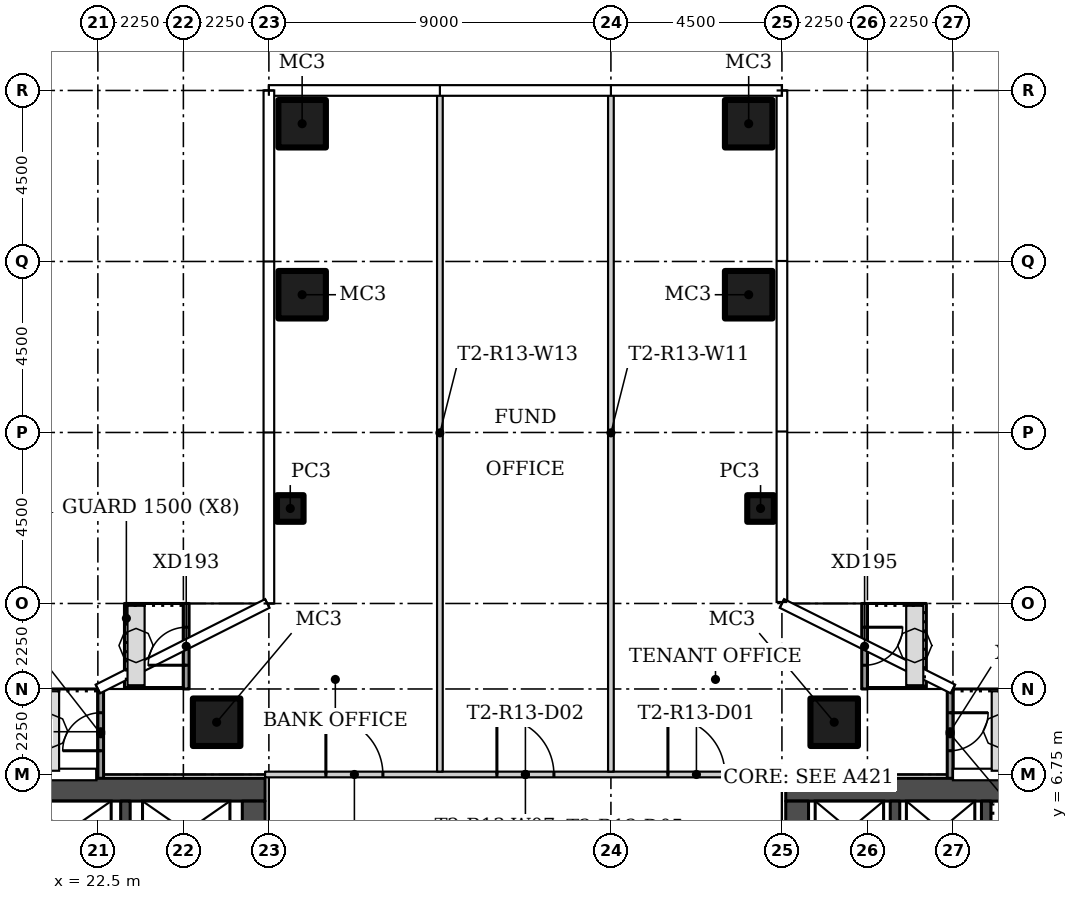
"""IFC4 building model, lengths in metres.
Left out: names, types, materials, properties, quantities, classifications, styles, units other than length and angle.
Written with IfcOpenShell. Run it as: python <this file> out.ifc"""

import sys

from ifc_helpers import new_model, si_unit, direction, frame, frame_2d, origin, origin_2d, place, context, subcontext, project, spatial, rectangle, hollow_rectangle, extrude, element, fill, save


model = new_model("IFC4")
c1 = context("Model", 3, precision=1e-05, world=origin(), true_north=direction((0.0, 1.0)))
c2 = subcontext(c1, "Body", "Model", "MODEL_VIEW")
j1 = project(units=[si_unit("LENGTHUNIT", "METRE"), si_unit("PLANEANGLEUNIT", "RADIAN")], contexts=[c1])
p1 = place(None, origin())
s1 = spatial("IfcSite", under=j1, at=p1, CompositionType="ELEMENT")
p2 = place(p1, origin())
s2 = spatial("IfcBuilding", under=s1, at=p2, CompositionType="ELEMENT")
p3 = place(p2, frame((0.0, 0.0, 124.8)))
s3 = spatial("IfcBuildingStorey", under=s2, at=p3, CompositionType="ELEMENT", Elevation=124.8)
for number, where in (
    (1, (25.625, 8.125, 0.0)),
    (2, (41.875, 8.125, 0.0)),
):
    element("IfcColumn", number, at=place(p3, frame(where)), inside=s3, PredefinedType="COLUMN", context=c2, shape_type="SweptSolid", body=[
        extrude(hollow_rectangle(XDim=1.25, YDim=1.25, WallThickness=0.05, at=origin_2d()), origin(), (0.0, 0.0, 1.0), 3.45),
    ])
p4 = place(p3, frame((39.938, 13.75, 0.0)))
e3 = element("IfcColumn", 3, at=p4, inside=s3, PredefinedType="COLUMN", context=c2, shape_type="SweptSolid", body=[
    extrude(hollow_rectangle(XDim=0.7, YDim=0.7, WallThickness=0.025, at=origin_2d()), origin(), (0.0, 0.0, 1.0), 3.45),
])
for number, where in (
    (4, (39.625, 19.375, 0.0)),
    (5, (39.625, 23.875, 0.0)),
):
    element("IfcColumn", number, at=place(p3, frame(where)), inside=s3, PredefinedType="COLUMN", context=c2, shape_type="SweptSolid", body=[
        extrude(hollow_rectangle(XDim=1.25, YDim=1.25, WallThickness=0.05, at=origin_2d()), origin(), (0.0, 0.0, 1.0), 3.45),
    ])
p5 = place(p3, frame((27.562, 13.75, 0.0)))
e6 = element("IfcColumn", 6, at=p5, inside=s3, PredefinedType="COLUMN", context=c2, shape_type="SweptSolid", body=[
    extrude(hollow_rectangle(XDim=0.7, YDim=0.7, WallThickness=0.025, at=origin_2d()), origin(), (0.0, 0.0, 1.0), 3.45),
])
for number, where in (
    (7, (27.875, 19.375, 0.0)),
    (8, (27.875, 23.875, 0.0)),
):
    element("IfcColumn", number, at=place(p3, frame(where)), inside=s3, PredefinedType="COLUMN", context=c2, shape_type="SweptSolid", body=[
        extrude(hollow_rectangle(XDim=1.25, YDim=1.25, WallThickness=0.05, at=origin_2d()), origin(), (0.0, 0.0, 1.0), 3.45),
    ])
p6 = place(p3, frame((26.9, 6.75, 0.0)))
e9 = element("IfcWall", 9, at=p6, inside=s3, PredefinedType="PARTITIONING", context=c2, shape_type="SweptSolid", body=[
    extrude(rectangle(XDim=13.7, YDim=0.15, at=frame_2d((6.85, 0.0))), origin(), (0.0, 0.0, 1.0), 3.45),
])
p7 = place(p6, frame((10.6, 0.0, 0.0)))
e10 = element("IfcOpeningElement", 10, at=p7, cuts=e9, PredefinedType="OPENING", context=c2, shape_type="SweptSolid", body=[
    extrude(rectangle(XDim=1.5, YDim=2.1, at=frame_2d((0.75, 1.05))), frame((0.0, 0.085, 0.0), z_axis=(0.0, -1.0, 0.0), x_axis=(1.0, 0.0, 0.0)), (0.0, 0.0, 1.0), 0.17),
])
p8 = place(p6, frame((6.1, 0.0, 0.0)))
e11 = element("IfcOpeningElement", 11, at=p8, cuts=e9, PredefinedType="OPENING", context=c2, shape_type="SweptSolid", body=[
    extrude(rectangle(XDim=1.5, YDim=2.1, at=frame_2d((0.75, 1.05))), frame((0.0, 0.085, 0.0), z_axis=(0.0, -1.0, 0.0), x_axis=(1.0, 0.0, 0.0)), (0.0, 0.0, 1.0), 0.17),
])
p9 = place(p6, frame((1.6, 0.0, 0.0)))
e12 = element("IfcOpeningElement", 12, at=p9, cuts=e9, PredefinedType="OPENING", context=c2, shape_type="SweptSolid", body=[
    extrude(rectangle(XDim=1.5, YDim=2.1, at=frame_2d((0.75, 1.05))), frame((0.0, 0.085, 0.0), z_axis=(0.0, -1.0, 0.0), x_axis=(1.0, 0.0, 0.0)), (0.0, 0.0, 1.0), 0.17),
])
for number, where, z_axis, x_axis in (
    (13, (36.0, 24.655, 0.0), (0.0, 0.0, 1.0), (0.0, -1.0, 0.0)),
    (14, (31.5, 24.655, 0.0), (0.0, 0.0, 1.0), (0.0, -1.0, 0.0)),
):
    element("IfcWall", number, at=place(p3, frame(where, z_axis=z_axis, x_axis=x_axis)), inside=s3, PredefinedType="PARTITIONING", context=c2, shape_type="SweptSolid", body=[
        extrude(rectangle(XDim=17.83, YDim=0.15, at=frame_2d((8.915, 0.0))), origin(), (0.0, 0.0, 1.0), 3.45),
    ])
p10 = place(p3, frame((24.825, 9.0, 0.0), z_axis=(0.0, 0.0, 1.0), x_axis=(0.0, 1.0, 0.0)))
e15 = element("IfcWall", 15, at=p10, inside=s3, PredefinedType="SOLIDWALL", context=c2, shape_type="SweptSolid", body=[
    extrude(rectangle(XDim=2.25, YDim=0.15, at=frame_2d((1.125, 0.0))), origin(), (0.0, 0.0, 1.0), 3.45),
])
p11 = place(p10, frame((0.625, 0.0, 0.0)))
e16 = element("IfcOpeningElement", 16, at=p11, cuts=e15, PredefinedType="OPENING", context=c2, shape_type="SweptSolid", body=[
    extrude(rectangle(XDim=1.0, YDim=2.4, at=frame_2d((0.5, 1.2))), frame((0.0, 0.085, 0.0), z_axis=(0.0, -1.0, 0.0), x_axis=(1.0, 0.0, 0.0)), (0.0, 0.0, 1.0), 0.17),
])
p12 = place(p3, frame((22.575, 6.643, 0.0), z_axis=(0.0, 0.0, 1.0), x_axis=(0.0, 1.0, 0.0)))
e17 = element("IfcWall", 17, at=p12, inside=s3, PredefinedType="SOLIDWALL", context=c2, shape_type="SweptSolid", body=[
    extrude(rectangle(XDim=2.357, YDim=0.15, at=frame_2d((1.178, 0.0))), origin(), (0.0, 0.0, 1.0), 3.45),
])
p13 = place(p12, frame((0.732, 0.0, 0.0)))
e18 = element("IfcOpeningElement", 18, at=p13, cuts=e17, PredefinedType="OPENING", context=c2, shape_type="SweptSolid", body=[
    extrude(rectangle(XDim=1.0, YDim=2.4, at=frame_2d((0.5, 1.2))), frame((0.0, 0.085, 0.0), z_axis=(0.0, -1.0, 0.0), x_axis=(1.0, 0.0, 0.0)), (0.0, 0.0, 1.0), 0.17),
])
p14 = place(p3, frame((42.675, 11.25, 0.0), z_axis=(0.0, 0.0, 1.0), x_axis=(0.0, -1.0, 0.0)))
e19 = element("IfcWall", 19, at=p14, inside=s3, PredefinedType="SOLIDWALL", context=c2, shape_type="SweptSolid", body=[
    extrude(rectangle(XDim=2.25, YDim=0.15, at=frame_2d((1.125, 0.0))), origin(), (0.0, 0.0, 1.0), 3.45),
])
p15 = place(p14, frame((0.625, 0.0, 0.0)))
e20 = element("IfcOpeningElement", 20, at=p15, cuts=e19, PredefinedType="OPENING", context=c2, shape_type="SweptSolid", body=[
    extrude(rectangle(XDim=1.0, YDim=2.4, at=frame_2d((0.5, 1.2))), frame((0.0, 0.085, 0.0), z_axis=(0.0, -1.0, 0.0), x_axis=(1.0, 0.0, 0.0)), (0.0, 0.0, 1.0), 0.17),
])
p16 = place(p3, frame((44.925, 9.0, 0.0), z_axis=(0.0, 0.0, 1.0), x_axis=(0.0, -1.0, 0.0)))
e21 = element("IfcWall", 21, at=p16, inside=s3, PredefinedType="SOLIDWALL", context=c2, shape_type="SweptSolid", body=[
    extrude(rectangle(XDim=2.357, YDim=0.15, at=frame_2d((1.178, 0.0))), origin(), (0.0, 0.0, 1.0), 3.45),
])
p17 = place(p16, frame((0.625, 0.0, 0.0)))
e22 = element("IfcOpeningElement", 22, at=p17, cuts=e21, PredefinedType="OPENING", context=c2, shape_type="SweptSolid", body=[
    extrude(rectangle(XDim=1.0, YDim=2.4, at=frame_2d((0.5, 1.2))), frame((0.0, 0.085, 0.0), z_axis=(0.0, -1.0, 0.0), x_axis=(1.0, 0.0, 0.0)), (0.0, 0.0, 1.0), 0.17),
])
p18 = place(p3, frame((13.6, 6.35, 0.0)))
e23 = element("IfcWall", 23, at=p18, inside=s3, PredefinedType="SHEAR", context=c2, shape_type="SweptSolid", body=[
    extrude(rectangle(XDim=13.3, YDim=0.6, at=frame_2d((6.65, 0.0))), origin(), (0.0, 0.0, 1.0), 3.45),
])
p19 = place(p3, frame((26.6, 6.05, 0.0), z_axis=(0.0, 0.0, 1.0), x_axis=(0.0, -1.0, 0.0)))
e24 = element("IfcWall", 24, at=p19, inside=s3, PredefinedType="SHEAR", context=c2, shape_type="SweptSolid", body=[
    extrude(rectangle(XDim=12.1, YDim=0.6, at=frame_2d((6.05, 0.0))), origin(), (0.0, 0.0, 1.0), 3.45),
])
p20 = place(p19, frame((10.1, 0.0, 0.0)))
e25 = element("IfcOpeningElement", 25, at=p20, cuts=e24, PredefinedType="OPENING", context=c2, shape_type="SweptSolid", body=[
    extrude(rectangle(XDim=1.2, YDim=2.1, at=frame_2d((0.6, 1.05))), frame((0.0, 0.31, 0.0), z_axis=(0.0, -1.0, 0.0), x_axis=(1.0, 0.0, 0.0)), (0.0, 0.0, 1.0), 0.62),
])
p21 = place(p19, frame((3.9, 0.0, 0.0)))
e26 = element("IfcOpeningElement", 26, at=p21, cuts=e24, PredefinedType="OPENING", context=c2, shape_type="SweptSolid", body=[
    extrude(rectangle(XDim=1.8, YDim=2.4, at=frame_2d((0.9, 1.2))), frame((0.0, 0.31, 0.0), z_axis=(0.0, -1.0, 0.0), x_axis=(1.0, 0.0, 0.0)), (0.0, 0.0, 1.0), 0.62),
])
p22 = place(p3, frame((23.225, 3.25, 0.0), z_axis=(0.0, 0.0, 1.0), x_axis=(0.0, 1.0, 0.0)))
e27 = element("IfcWall", 27, at=p22, inside=s3, PredefinedType="SHEAR", context=c2, shape_type="SweptSolid", body=[
    extrude(rectangle(XDim=2.8, YDim=0.25, at=frame_2d((1.4, 0.0))), origin(), (0.0, 0.0, 1.0), 3.45),
])
p23 = place(p3, frame((53.9, 6.35, 0.0), z_axis=(0.0, 0.0, 1.0), x_axis=(-1.0, 0.0, 0.0)))
e28 = element("IfcWall", 28, at=p23, inside=s3, PredefinedType="SHEAR", context=c2, shape_type="SweptSolid", body=[
    extrude(rectangle(XDim=13.3, YDim=0.6, at=frame_2d((6.65, 0.0))), origin(), (0.0, 0.0, 1.0), 3.45),
])
p24 = place(p3, frame((40.9, -6.05, 0.0), z_axis=(0.0, 0.0, 1.0), x_axis=(0.0, 1.0, 0.0)))
e29 = element("IfcWall", 29, at=p24, inside=s3, PredefinedType="SHEAR", context=c2, shape_type="SweptSolid", body=[
    extrude(rectangle(XDim=12.1, YDim=0.6, at=frame_2d((6.05, 0.0))), origin(), (0.0, 0.0, 1.0), 3.45),
])
p25 = place(p24, frame((0.8, 0.0, 0.0)))
e30 = element("IfcOpeningElement", 30, at=p25, cuts=e29, PredefinedType="OPENING", context=c2, shape_type="SweptSolid", body=[
    extrude(rectangle(XDim=1.2, YDim=2.1, at=frame_2d((0.6, 1.05))), frame((0.0, 0.31, 0.0), z_axis=(0.0, -1.0, 0.0), x_axis=(1.0, 0.0, 0.0)), (0.0, 0.0, 1.0), 0.62),
])
p26 = place(p24, frame((6.4, 0.0, 0.0)))
e31 = element("IfcOpeningElement", 31, at=p26, cuts=e29, PredefinedType="OPENING", context=c2, shape_type="SweptSolid", body=[
    extrude(rectangle(XDim=1.8, YDim=2.4, at=frame_2d((0.9, 1.2))), frame((0.0, 0.31, 0.0), z_axis=(0.0, -1.0, 0.0), x_axis=(1.0, 0.0, 0.0)), (0.0, 0.0, 1.0), 0.62),
])
for number, where, z_axis, x_axis in (
    (32, (45.875, 3.25, 0.0), (0.0, 0.0, 1.0), (0.0, 1.0, 0.0)),
    (33, (43.475, 3.25, 0.0), (0.0, 0.0, 1.0), (0.0, 1.0, 0.0)),
):
    element("IfcWall", number, at=place(p3, frame(where, z_axis=z_axis, x_axis=x_axis)), inside=s3, PredefinedType="SHEAR", context=c2, shape_type="SweptSolid", body=[
        extrude(rectangle(XDim=2.8, YDim=0.25, at=frame_2d((1.4, 0.0))), origin(), (0.0, 0.0, 1.0), 3.45),
    ])
p27 = place(p7, origin())
e34 = element("IfcDoor", 34, at=p27, inside=s3, OperationType="DOUBLE_DOOR_SINGLE_SWING", PredefinedType="DOOR", context=c2, shape_type="SweptSolid", body=[
    extrude(rectangle(XDim=1.5, YDim=2.1, at=frame_2d((0.75, 1.05))), frame((0.0, 0.025, 0.0), z_axis=(0.0, -1.0, 0.0), x_axis=(1.0, 0.0, 0.0)), (0.0, 0.0, 1.0), 0.05),
])
fill(e10, e34)
p28 = place(p8, origin())
e35 = element("IfcDoor", 35, at=p28, inside=s3, OperationType="DOUBLE_DOOR_SINGLE_SWING", PredefinedType="DOOR", context=c2, shape_type="SweptSolid", body=[
    extrude(rectangle(XDim=1.5, YDim=2.1, at=frame_2d((0.75, 1.05))), frame((0.0, 0.025, 0.0), z_axis=(0.0, -1.0, 0.0), x_axis=(1.0, 0.0, 0.0)), (0.0, 0.0, 1.0), 0.05),
])
fill(e11, e35)
p29 = place(p9, origin())
e36 = element("IfcDoor", 36, at=p29, inside=s3, OperationType="DOUBLE_DOOR_SINGLE_SWING", PredefinedType="DOOR", context=c2, shape_type="SweptSolid", body=[
    extrude(rectangle(XDim=1.5, YDim=2.1, at=frame_2d((0.75, 1.05))), frame((0.0, 0.025, 0.0), z_axis=(0.0, -1.0, 0.0), x_axis=(1.0, 0.0, 0.0)), (0.0, 0.0, 1.0), 0.05),
])
fill(e12, e36)
p30 = place(p11, origin())
e37 = element("IfcDoor", 37, at=p30, inside=s3, OperationType="SINGLE_SWING_RIGHT", PredefinedType="DOOR", context=c2, shape_type="SweptSolid", body=[
    extrude(rectangle(XDim=1.0, YDim=2.4, at=frame_2d((0.5, 1.2))), frame((0.0, 0.025, 0.0), z_axis=(0.0, -1.0, 0.0), x_axis=(1.0, 0.0, 0.0)), (0.0, 0.0, 1.0), 0.05),
])
fill(e16, e37)
p31 = place(p13, origin())
e38 = element("IfcDoor", 38, at=p31, inside=s3, OperationType="SINGLE_SWING_LEFT", PredefinedType="DOOR", context=c2, shape_type="SweptSolid", body=[
    extrude(rectangle(XDim=1.0, YDim=2.4, at=frame_2d((0.5, 1.2))), frame((0.0, 0.025, 0.0), z_axis=(0.0, -1.0, 0.0), x_axis=(1.0, 0.0, 0.0)), (0.0, 0.0, 1.0), 0.05),
])
fill(e18, e38)
p32 = place(p15, origin())
e39 = element("IfcDoor", 39, at=p32, inside=s3, OperationType="SINGLE_SWING_RIGHT", PredefinedType="DOOR", context=c2, shape_type="SweptSolid", body=[
    extrude(rectangle(XDim=1.0, YDim=2.4, at=frame_2d((0.5, 1.2))), frame((0.0, 0.025, 0.0), z_axis=(0.0, -1.0, 0.0), x_axis=(1.0, 0.0, 0.0)), (0.0, 0.0, 1.0), 0.05),
])
fill(e20, e39)
p33 = place(p17, origin())
e40 = element("IfcDoor", 40, at=p33, inside=s3, OperationType="SINGLE_SWING_LEFT", PredefinedType="DOOR", context=c2, shape_type="SweptSolid", body=[
    extrude(rectangle(XDim=1.0, YDim=2.4, at=frame_2d((0.5, 1.2))), frame((0.0, 0.025, 0.0), z_axis=(0.0, -1.0, 0.0), x_axis=(1.0, 0.0, 0.0)), (0.0, 0.0, 1.0), 0.05),
])
fill(e22, e40)
save(model, sys.argv[1])
